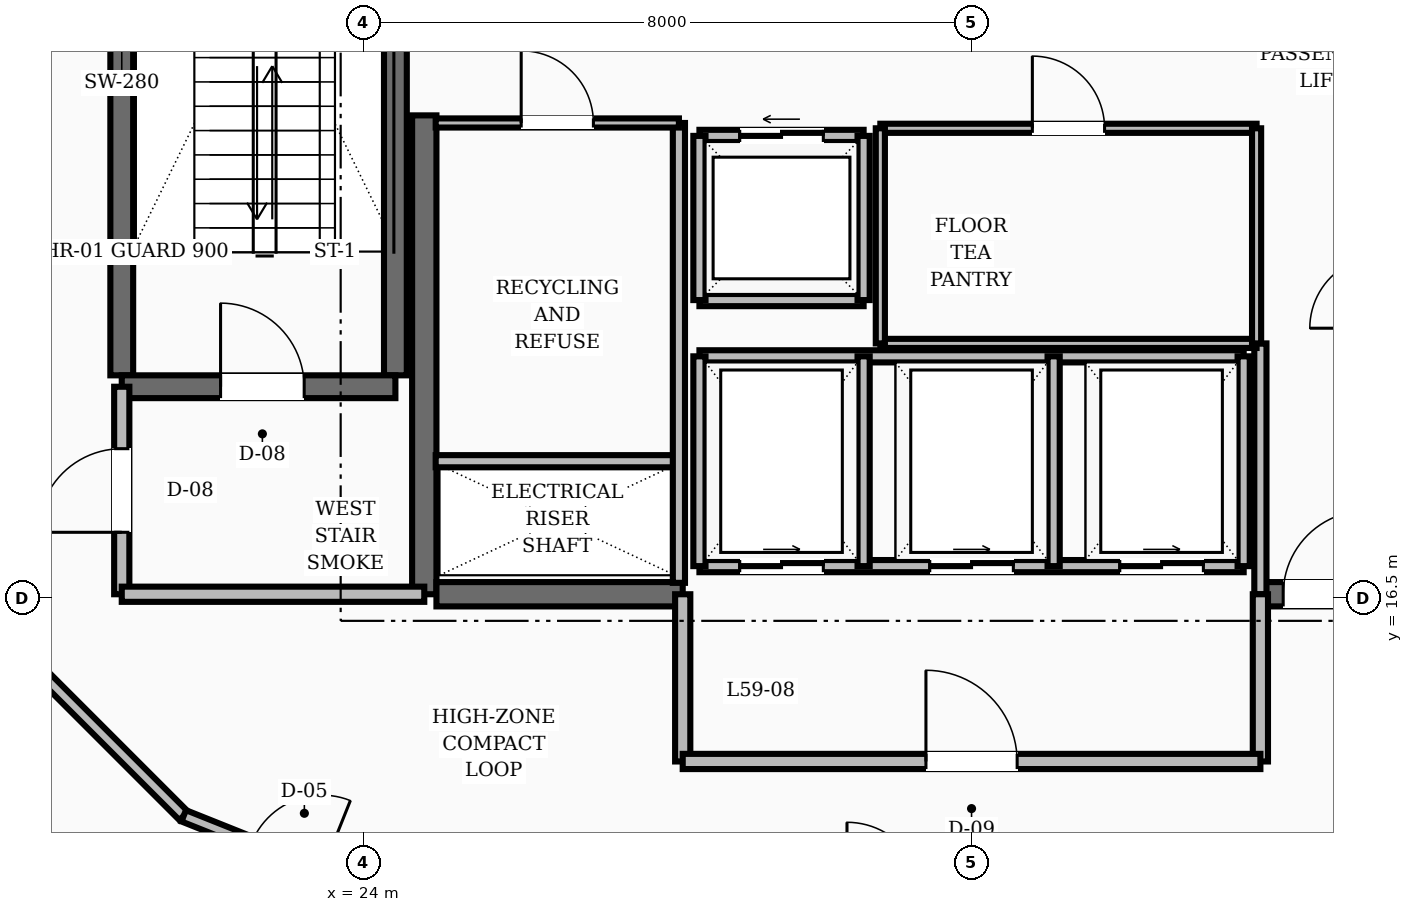
"""IFC4 building model, lengths in metres.
Left out: names, types, materials, properties, quantities, classifications, styles, units other than length and angle.
Written with IfcOpenShell. Run it as: python <this file> out.ifc"""

import sys

from ifc_helpers import new_model, si_unit, direction, frame, frame_2d, origin, place, context, subcontext, project, spatial, rectangle, extrude, element, fill, save


model = new_model("IFC4")
c1 = context("Model", 3, precision=1e-05, world=origin(), true_north=direction((0.0, 1.0)))
c2 = subcontext(c1, "Body", "Model", "MODEL_VIEW")
j1 = project(units=[si_unit("LENGTHUNIT", "METRE"), si_unit("PLANEANGLEUNIT", "RADIAN")], contexts=[c1])
p1 = place(None, origin())
s1 = spatial("IfcSite", under=j1, at=p1, CompositionType="ELEMENT")
p2 = place(p1, origin())
s2 = spatial("IfcBuilding", under=s1, at=p2, CompositionType="ELEMENT")
p3 = place(p2, frame((0.0, 0.0, 229.2)))
s3 = spatial("IfcBuildingStorey", under=s2, at=p3, CompositionType="ELEMENT", Elevation=229.2)
p4 = place(p3, frame((24.8, 16.55, 0.0), z_axis=(0.0, 0.0, 1.0), x_axis=(0.0, 1.0, 0.0)))
e1 = element("IfcWall", 1, at=p4, inside=s3, PredefinedType="SHEAR", context=c2, shape_type="SweptSolid", body=[
    extrude(rectangle(XDim=6.3, YDim=0.32, at=frame_2d((3.15, 0.0))), origin(), (0.0, 0.0, 1.0), 3.6),
])
p5 = place(p3, frame((24.96, 16.55, 0.0), z_axis=(0.0, 0.0, 1.0), x_axis=(1.0, 0.0, 0.0)))
e2 = element("IfcWall", 2, at=p5, inside=s3, PredefinedType="SHEAR", context=c2, shape_type="SweptSolid", body=[
    extrude(rectangle(XDim=3.24, YDim=0.32, at=frame_2d((1.62, 0.0))), origin(), (0.0, 0.0, 1.0), 3.6),
])
p6 = place(p3, frame((35.8, 16.55, 0.0), z_axis=(0.0, 0.0, 1.0), x_axis=(1.0, 0.0, 0.0)))
e3 = element("IfcWall", 3, at=p6, inside=s3, PredefinedType="SHEAR", context=c2, shape_type="SweptSolid", body=[
    extrude(rectangle(XDim=3.24, YDim=0.32, at=frame_2d((1.62, 0.0))), origin(), (0.0, 0.0, 1.0), 3.6),
])
p7 = place(p6, frame((0.3, 0.0, 0.0)))
e4 = element("IfcOpeningElement", 4, at=p7, cuts=e3, PredefinedType="OPENING", context=c2, shape_type="SweptSolid", body=[
    extrude(rectangle(XDim=1.1, YDim=2.1, at=frame_2d((0.55, 1.05))), frame((0.0, 0.17, 0.0), z_axis=(0.0, -1.0, 0.0), x_axis=(1.0, 0.0, 0.0)), (0.0, 0.0, 1.0), 0.34),
])
for number, where, z_axis, x_axis in (
    (5, (20.82, 19.43, 0.0), (0.0, 0.0, 1.0), (0.0, 1.0, 0.0)),
    (6, (24.42, 19.43, 0.0), (0.0, 0.0, 1.0), (0.0, 1.0, 0.0)),
):
    element("IfcWall", number, at=place(p3, frame(where, z_axis=z_axis, x_axis=x_axis)), inside=s3, PredefinedType="SHEAR", context=c2, shape_type="SweptSolid", body=[
        extrude(rectangle(XDim=8.74, YDim=0.3, at=frame_2d((4.37, 0.0))), origin(), (0.0, 0.0, 1.0), 3.6),
    ])
p8 = place(p3, frame((20.82, 19.28, 0.0), z_axis=(0.0, 0.0, 1.0), x_axis=(1.0, 0.0, 0.0)))
e7 = element("IfcWall", 7, at=p8, inside=s3, PredefinedType="SHEAR", context=c2, shape_type="SweptSolid", body=[
    extrude(rectangle(XDim=3.6, YDim=0.3, at=frame_2d((1.8, 0.0))), origin(), (0.0, 0.0, 1.0), 3.6),
])
p9 = place(p8, frame((1.3, 0.0, 0.0)))
e8 = element("IfcOpeningElement", 8, at=p9, cuts=e7, PredefinedType="OPENING", context=c2, shape_type="SweptSolid", body=[
    extrude(rectangle(XDim=1.1, YDim=2.1, at=frame_2d((0.55, 1.05))), frame((0.0, 0.16, 0.0), z_axis=(0.0, -1.0, 0.0), x_axis=(1.0, 0.0, 0.0)), (0.0, 0.0, 1.0), 0.32),
])
p10 = place(p3, frame((20.82, 16.55, 0.0), z_axis=(0.0, 0.0, 1.0), x_axis=(0.0, 1.0, 0.0)))
e9 = element("IfcWall", 9, at=p10, inside=s3, PredefinedType="SOLIDWALL", context=c2, shape_type="SweptSolid", body=[
    extrude(rectangle(XDim=2.73, YDim=0.2, at=frame_2d((1.365, 0.0))), origin(), (0.0, 0.0, 1.0), 2.87),
])
p11 = place(p10, frame((0.815, 0.0, 0.0)))
e10 = element("IfcOpeningElement", 10, at=p11, cuts=e9, PredefinedType="OPENING", context=c2, shape_type="SweptSolid", body=[
    extrude(rectangle(XDim=1.1, YDim=2.1, at=frame_2d((0.55, 1.05))), frame((0.0, 0.11, 0.0), z_axis=(0.0, -1.0, 0.0), x_axis=(1.0, 0.0, 0.0)), (0.0, 0.0, 1.0), 0.22),
])
p12 = place(p3, frame((20.82, 16.55, 0.0), z_axis=(0.0, 0.0, 1.0), x_axis=(1.0, 0.0, 0.0)))
e11 = element("IfcWall", 11, at=p12, inside=s3, PredefinedType="SOLIDWALL", context=c2, shape_type="SweptSolid", body=[
    extrude(rectangle(XDim=3.98, YDim=0.2, at=frame_2d((1.99, 0.0))), origin(), (0.0, 0.0, 1.0), 2.87),
])
p13 = place(p3, frame((35.8, 16.55, 0.0), z_axis=(0.0, 0.0, 1.0), x_axis=(0.0, 1.0, 0.0)))
e12 = element("IfcWall", 12, at=p13, inside=s3, PredefinedType="SOLIDWALL", context=c2, shape_type="SweptSolid", body=[
    extrude(rectangle(XDim=3.3, YDim=0.16, at=frame_2d((1.65, 0.0))), origin(), (0.0, 0.0, 1.0), 2.87),
])
for number, where, z_axis, x_axis in (
    (13, (28.2, 14.35, 0.0), (0.0, 0.0, 1.0), (0.0, 1.0, 0.0)),
    (14, (35.8, 14.35, 0.0), (0.0, 0.0, 1.0), (0.0, 1.0, 0.0)),
):
    element("IfcWall", number, at=place(p3, frame(where, z_axis=z_axis, x_axis=x_axis)), inside=s3, PredefinedType="SOLIDWALL", context=c2, shape_type="SweptSolid", body=[
        extrude(rectangle(XDim=2.2, YDim=0.2, at=frame_2d((1.1, 0.0))), origin(), (0.0, 0.0, 1.0), 2.87),
    ])
p14 = place(p3, frame((28.2, 14.35, 0.0), z_axis=(0.0, 0.0, 1.0), x_axis=(1.0, 0.0, 0.0)))
e15 = element("IfcWall", 15, at=p14, inside=s3, PredefinedType="SOLIDWALL", context=c2, shape_type="SweptSolid", body=[
    extrude(rectangle(XDim=7.6, YDim=0.2, at=frame_2d((3.8, 0.0))), origin(), (0.0, 0.0, 1.0), 2.87),
])
p15 = place(p14, frame((3.2, 0.0, 0.0)))
e16 = element("IfcOpeningElement", 16, at=p15, cuts=e15, PredefinedType="OPENING", context=c2, shape_type="SweptSolid", body=[
    extrude(rectangle(XDim=1.2, YDim=2.1, at=frame_2d((0.6, 1.05))), frame((0.0, 0.11, 0.0), z_axis=(0.0, -1.0, 0.0), x_axis=(1.0, 0.0, 0.0)), (0.0, 0.0, 1.0), 0.22),
])
p16 = place(p3, frame((28.42, 22.58, 0.0), z_axis=(0.0, 0.0, 1.0), x_axis=(1.0, 0.0, 0.0)))
e17 = element("IfcWall", 17, at=p16, inside=s3, PredefinedType="SOLIDWALL", context=c2, shape_type="SweptSolid", body=[
    extrude(rectangle(XDim=2.16, YDim=0.16, at=frame_2d((1.08, 0.0))), origin(), (0.0, 0.0, 1.0), 2.87),
])
p17 = place(p16, frame((0.53, 0.0, 0.0)))
e18 = element("IfcOpeningElement", 18, at=p17, cuts=e17, PredefinedType="OPENING", context=c2, shape_type="SweptSolid", body=[
    extrude(rectangle(XDim=1.1, YDim=2.15, at=frame_2d((0.55, 1.075))), frame((0.0, 0.09, 0.0), z_axis=(0.0, -1.0, 0.0), x_axis=(1.0, 0.0, 0.0)), (0.0, 0.0, 1.0), 0.18),
])
for number, where, z_axis, x_axis in (
    (19, (28.42, 20.42, 0.0), (0.0, 0.0, 1.0), (1.0, 0.0, 0.0)),
    (20, (28.42, 20.42, 0.0), (0.0, 0.0, 1.0), (0.0, 1.0, 0.0)),
    (21, (30.58, 20.42, 0.0), (0.0, 0.0, 1.0), (0.0, 1.0, 0.0)),
):
    element("IfcWall", number, at=place(p3, frame(where, z_axis=z_axis, x_axis=x_axis)), inside=s3, PredefinedType="SOLIDWALL", context=c2, shape_type="SweptSolid", body=[
        extrude(rectangle(XDim=2.16, YDim=0.16, at=frame_2d((1.08, 0.0))), origin(), (0.0, 0.0, 1.0), 2.87),
    ])
p18 = place(p3, frame((28.42, 16.92, 0.0), z_axis=(0.0, 0.0, 1.0), x_axis=(1.0, 0.0, 0.0)))
e22 = element("IfcWall", 22, at=p18, inside=s3, PredefinedType="SOLIDWALL", context=c2, shape_type="SweptSolid", body=[
    extrude(rectangle(XDim=7.16, YDim=0.16, at=frame_2d((3.58, 0.0))), origin(), (0.0, 0.0, 1.0), 2.87),
])
p19 = place(p18, frame((0.53, 0.0, 0.0)))
e23 = element("IfcOpeningElement", 23, at=p19, cuts=e22, PredefinedType="OPENING", context=c2, shape_type="SweptSolid", body=[
    extrude(rectangle(XDim=1.1, YDim=2.15, at=frame_2d((0.55, 1.075))), frame((0.0, 0.09, 0.0), z_axis=(0.0, -1.0, 0.0), x_axis=(1.0, 0.0, 0.0)), (0.0, 0.0, 1.0), 0.18),
])
p20 = place(p18, frame((3.03, 0.0, 0.0)))
e24 = element("IfcOpeningElement", 24, at=p20, cuts=e22, PredefinedType="OPENING", context=c2, shape_type="SweptSolid", body=[
    extrude(rectangle(XDim=1.1, YDim=2.15, at=frame_2d((0.55, 1.075))), frame((0.0, 0.09, 0.0), z_axis=(0.0, -1.0, 0.0), x_axis=(1.0, 0.0, 0.0)), (0.0, 0.0, 1.0), 0.18),
])
p21 = place(p18, frame((5.53, 0.0, 0.0)))
e25 = element("IfcOpeningElement", 25, at=p21, cuts=e22, PredefinedType="OPENING", context=c2, shape_type="SweptSolid", body=[
    extrude(rectangle(XDim=1.1, YDim=2.15, at=frame_2d((0.55, 1.075))), frame((0.0, 0.09, 0.0), z_axis=(0.0, -1.0, 0.0), x_axis=(1.0, 0.0, 0.0)), (0.0, 0.0, 1.0), 0.18),
])
p22 = place(p3, frame((28.42, 19.68, 0.0), z_axis=(0.0, 0.0, 1.0), x_axis=(1.0, 0.0, 0.0)))
e26 = element("IfcWall", 26, at=p22, inside=s3, PredefinedType="SOLIDWALL", context=c2, shape_type="SweptSolid", body=[
    extrude(rectangle(XDim=7.16, YDim=0.16, at=frame_2d((3.58, 0.0))), origin(), (0.0, 0.0, 1.0), 2.87),
])
for number, where, z_axis, x_axis in (
    (27, (28.42, 16.92, 0.0), (0.0, 0.0, 1.0), (0.0, 1.0, 0.0)),
    (28, (30.58, 16.92, 0.0), (0.0, 0.0, 1.0), (0.0, 1.0, 0.0)),
    (29, (33.08, 16.92, 0.0), (0.0, 0.0, 1.0), (0.0, 1.0, 0.0)),
    (30, (35.58, 16.92, 0.0), (0.0, 0.0, 1.0), (0.0, 1.0, 0.0)),
):
    element("IfcWall", number, at=place(p3, frame(where, z_axis=z_axis, x_axis=x_axis)), inside=s3, PredefinedType="SOLIDWALL", context=c2, shape_type="SweptSolid", body=[
        extrude(rectangle(XDim=2.76, YDim=0.16, at=frame_2d((1.38, 0.0))), origin(), (0.0, 0.0, 1.0), 2.87),
    ])
p23 = place(p3, frame((30.8, 22.68, 0.0), z_axis=(0.0, 0.0, 1.0), x_axis=(1.0, 0.0, 0.0)))
e31 = element("IfcWall", 31, at=p23, inside=s3, PredefinedType="PARTITIONING", context=c2, shape_type="SweptSolid", body=[
    extrude(rectangle(XDim=4.95, YDim=0.12, at=frame_2d((2.475, 0.0))), origin(), (0.0, 0.0, 1.0), 2.87),
])
p24 = place(p23, frame((2.0, 0.0, 0.0)))
e32 = element("IfcOpeningElement", 32, at=p24, cuts=e31, PredefinedType="OPENING", context=c2, shape_type="SweptSolid", body=[
    extrude(rectangle(XDim=0.95, YDim=2.1, at=frame_2d((0.475, 1.05))), frame((0.0, 0.07, 0.0), z_axis=(0.0, -1.0, 0.0), x_axis=(1.0, 0.0, 0.0)), (0.0, 0.0, 1.0), 0.14),
])
p25 = place(p3, frame((30.8, 19.85, 0.0), z_axis=(0.0, 0.0, 1.0), x_axis=(1.0, 0.0, 0.0)))
e33 = element("IfcWall", 33, at=p25, inside=s3, PredefinedType="PARTITIONING", context=c2, shape_type="SweptSolid", body=[
    extrude(rectangle(XDim=4.95, YDim=0.12, at=frame_2d((2.475, 0.0))), origin(), (0.0, 0.0, 1.0), 2.87),
])
for number, where, z_axis, x_axis in (
    (34, (30.8, 19.85, 0.0), (0.0, 0.0, 1.0), (0.0, 1.0, 0.0)),
    (35, (35.75, 19.85, 0.0), (0.0, 0.0, 1.0), (0.0, 1.0, 0.0)),
):
    element("IfcWall", number, at=place(p3, frame(where, z_axis=z_axis, x_axis=x_axis)), inside=s3, PredefinedType="PARTITIONING", context=c2, shape_type="SweptSolid", body=[
        extrude(rectangle(XDim=2.83, YDim=0.12, at=frame_2d((1.415, 0.0))), origin(), (0.0, 0.0, 1.0), 2.87),
    ])
p26 = place(p3, frame((24.95, 18.3, 0.0), z_axis=(0.0, 0.0, 1.0), x_axis=(1.0, 0.0, 0.0)))
e36 = element("IfcWall", 36, at=p26, inside=s3, PredefinedType="SOLIDWALL", context=c2, shape_type="SweptSolid", body=[
    extrude(rectangle(XDim=3.2, YDim=0.16, at=frame_2d((1.6, 0.0))), origin(), (0.0, 0.0, 1.0), 2.87),
])
p27 = place(p3, frame((28.15, 16.7, 0.0), z_axis=(0.0, 0.0, 1.0), x_axis=(0.0, 1.0, 0.0)))
e37 = element("IfcWall", 37, at=p27, inside=s3, PredefinedType="SOLIDWALL", context=c2, shape_type="SweptSolid", body=[
    extrude(rectangle(XDim=6.05, YDim=0.16, at=frame_2d((3.025, 0.0))), origin(), (0.0, 0.0, 1.0), 2.87),
])
p28 = place(p3, frame((24.95, 22.75, 0.0), z_axis=(0.0, 0.0, 1.0), x_axis=(1.0, 0.0, 0.0)))
e38 = element("IfcWall", 38, at=p28, inside=s3, PredefinedType="PARTITIONING", context=c2, shape_type="SweptSolid", body=[
    extrude(rectangle(XDim=3.2, YDim=0.12, at=frame_2d((1.6, 0.0))), origin(), (0.0, 0.0, 1.0), 2.87),
])
p29 = place(p28, frame((1.125, 0.0, 0.0)))
e39 = element("IfcOpeningElement", 39, at=p29, cuts=e38, PredefinedType="OPENING", context=c2, shape_type="SweptSolid", body=[
    extrude(rectangle(XDim=0.95, YDim=2.1, at=frame_2d((0.475, 1.05))), frame((0.0, 0.07, 0.0), z_axis=(0.0, -1.0, 0.0), x_axis=(1.0, 0.0, 0.0)), (0.0, 0.0, 1.0), 0.14),
])
p30 = place(p3, frame((19.573, 15.697, 0.0), z_axis=(0.0, 0.0, 1.0), x_axis=(0.707106781187, -0.707106781187, 0.0)))
e40 = element("IfcWall", 40, at=p30, inside=s3, PredefinedType="SOLIDWALL", context=c2, shape_type="SweptSolid", body=[
    extrude(rectangle(XDim=2.916, YDim=0.16, at=frame_2d((1.458, 0.0))), origin(), (0.0, 0.0, 1.0), 2.87),
])
p31 = place(p3, frame((21.635, 13.635, 0.0), z_axis=(0.0, 0.0, 1.0), x_axis=(0.92856882165, -0.371160266542, 0.0)))
e41 = element("IfcWall", 41, at=p31, inside=s3, PredefinedType="SOLIDWALL", context=c2, shape_type="SweptSolid", body=[
    extrude(rectangle(XDim=2.923, YDim=0.16, at=frame_2d((1.461, 0.0))), origin(), (0.0, 0.0, 1.0), 2.87),
])
p32 = place(p31, frame((0.962, 0.0, 0.0)))
e42 = element("IfcOpeningElement", 42, at=p32, cuts=e41, PredefinedType="OPENING", context=c2, shape_type="SweptSolid", body=[
    extrude(rectangle(XDim=1.0, YDim=2.1, at=frame_2d((0.5, 1.05))), frame((0.0, 0.09, 0.0), z_axis=(0.0, -1.0, 0.0), x_axis=(1.0, 0.0, 0.0)), (0.0, 0.0, 1.0), 0.18),
])
p33 = place(p9, origin())
e43 = element("IfcDoor", 43, at=p33, inside=s3, OperationType="SINGLE_SWING_LEFT", PredefinedType="DOOR", context=c2, shape_type="SweptSolid", body=[
    extrude(rectangle(XDim=1.1, YDim=2.1, at=frame_2d((0.55, 1.05))), frame((0.0, 0.025, 0.0), z_axis=(0.0, -1.0, 0.0), x_axis=(1.0, 0.0, 0.0)), (0.0, 0.0, 1.0), 0.05),
])
fill(e8, e43)
p34 = place(p11, origin())
e44 = element("IfcDoor", 44, at=p34, inside=s3, OperationType="SINGLE_SWING_LEFT", PredefinedType="DOOR", context=c2, shape_type="SweptSolid", body=[
    extrude(rectangle(XDim=1.1, YDim=2.1, at=frame_2d((0.55, 1.05))), frame((0.0, 0.025, 0.0), z_axis=(0.0, -1.0, 0.0), x_axis=(1.0, 0.0, 0.0)), (0.0, 0.0, 1.0), 0.05),
])
fill(e10, e44)
p35 = place(p7, origin())
e45 = element("IfcDoor", 45, at=p35, inside=s3, OperationType="SINGLE_SWING_RIGHT", PredefinedType="DOOR", context=c2, shape_type="SweptSolid", body=[
    extrude(rectangle(XDim=1.1, YDim=2.1, at=frame_2d((0.55, 1.05))), frame((0.0, 0.025, 0.0), z_axis=(0.0, -1.0, 0.0), x_axis=(1.0, 0.0, 0.0)), (0.0, 0.0, 1.0), 0.05),
])
fill(e4, e45)
p36 = place(p15, origin())
e46 = element("IfcDoor", 46, at=p36, inside=s3, OperationType="SINGLE_SWING_LEFT", PredefinedType="DOOR", context=c2, shape_type="SweptSolid", body=[
    extrude(rectangle(XDim=1.2, YDim=2.1, at=frame_2d((0.6, 1.05))), frame((0.0, 0.025, 0.0), z_axis=(0.0, -1.0, 0.0), x_axis=(1.0, 0.0, 0.0)), (0.0, 0.0, 1.0), 0.05),
])
fill(e16, e46)
p37 = place(p17, origin())
e47 = element("IfcDoor", 47, at=p37, inside=s3, OperationType="SLIDING_TO_LEFT", PredefinedType="DOOR", context=c2, shape_type="SweptSolid", body=[
    extrude(rectangle(XDim=1.1, YDim=2.15, at=frame_2d((0.55, 1.075))), frame((0.0, 0.025, 0.0), z_axis=(0.0, -1.0, 0.0), x_axis=(1.0, 0.0, 0.0)), (0.0, 0.0, 1.0), 0.05),
])
fill(e18, e47)
p38 = place(p19, origin())
e48 = element("IfcDoor", 48, at=p38, inside=s3, OperationType="SLIDING_TO_RIGHT", PredefinedType="DOOR", context=c2, shape_type="SweptSolid", body=[
    extrude(rectangle(XDim=1.1, YDim=2.15, at=frame_2d((0.55, 1.075))), frame((0.0, 0.025, 0.0), z_axis=(0.0, -1.0, 0.0), x_axis=(1.0, 0.0, 0.0)), (0.0, 0.0, 1.0), 0.05),
])
fill(e23, e48)
p39 = place(p20, origin())
e49 = element("IfcDoor", 49, at=p39, inside=s3, OperationType="SLIDING_TO_RIGHT", PredefinedType="DOOR", context=c2, shape_type="SweptSolid", body=[
    extrude(rectangle(XDim=1.1, YDim=2.15, at=frame_2d((0.55, 1.075))), frame((0.0, 0.025, 0.0), z_axis=(0.0, -1.0, 0.0), x_axis=(1.0, 0.0, 0.0)), (0.0, 0.0, 1.0), 0.05),
])
fill(e24, e49)
p40 = place(p21, origin())
e50 = element("IfcDoor", 50, at=p40, inside=s3, OperationType="SLIDING_TO_RIGHT", PredefinedType="DOOR", context=c2, shape_type="SweptSolid", body=[
    extrude(rectangle(XDim=1.1, YDim=2.15, at=frame_2d((0.55, 1.075))), frame((0.0, 0.025, 0.0), z_axis=(0.0, -1.0, 0.0), x_axis=(1.0, 0.0, 0.0)), (0.0, 0.0, 1.0), 0.05),
])
fill(e25, e50)
p41 = place(p24, origin())
e51 = element("IfcDoor", 51, at=p41, inside=s3, OperationType="SINGLE_SWING_LEFT", PredefinedType="DOOR", context=c2, shape_type="SweptSolid", body=[
    extrude(rectangle(XDim=0.95, YDim=2.1, at=frame_2d((0.475, 1.05))), frame((0.0, 0.025, 0.0), z_axis=(0.0, -1.0, 0.0), x_axis=(1.0, 0.0, 0.0)), (0.0, 0.0, 1.0), 0.05),
])
fill(e32, e51)
p42 = place(p29, origin())
e52 = element("IfcDoor", 52, at=p42, inside=s3, OperationType="SINGLE_SWING_LEFT", PredefinedType="DOOR", context=c2, shape_type="SweptSolid", body=[
    extrude(rectangle(XDim=0.95, YDim=2.1, at=frame_2d((0.475, 1.05))), frame((0.0, 0.025, 0.0), z_axis=(0.0, -1.0, 0.0), x_axis=(1.0, 0.0, 0.0)), (0.0, 0.0, 1.0), 0.05),
])
fill(e39, e52)
save(model, sys.argv[1])
